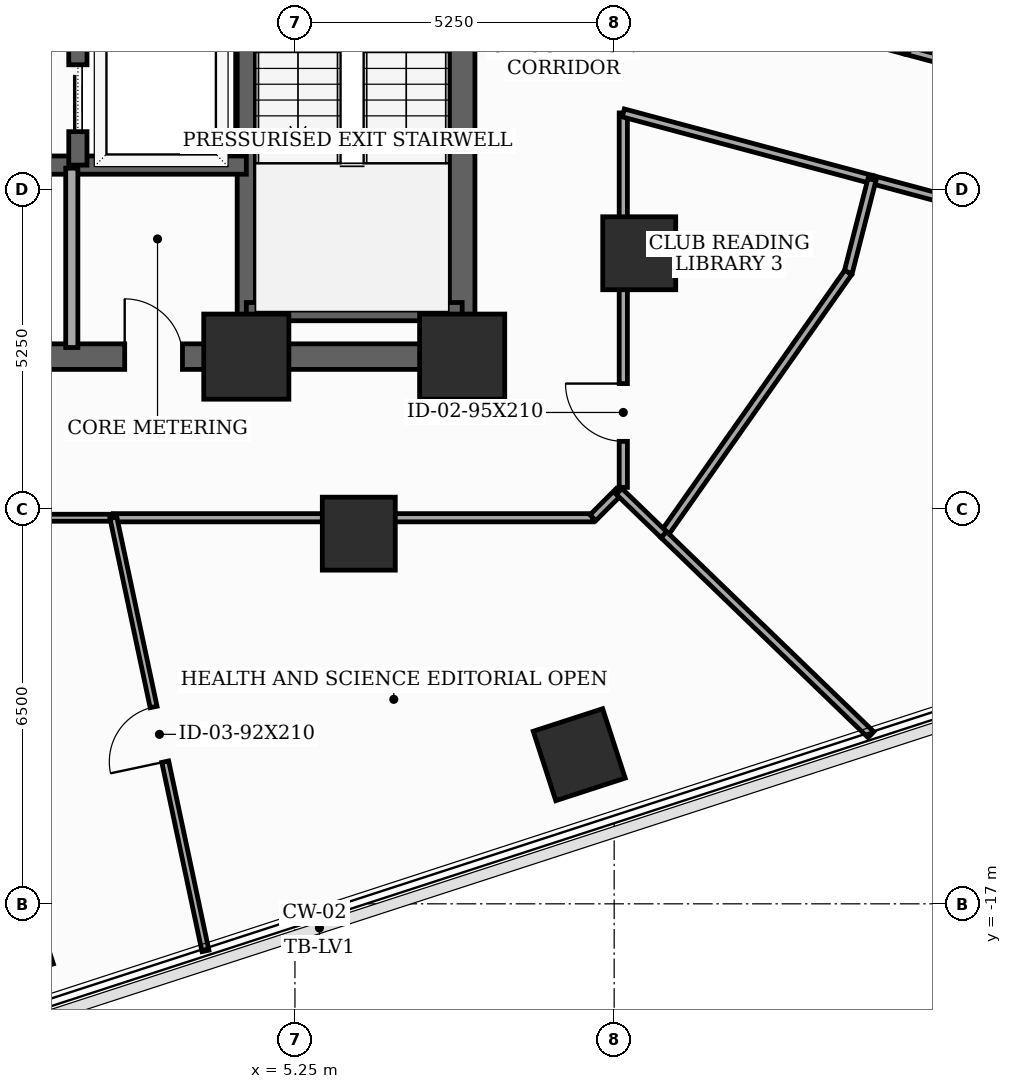
"""IFC4 building model, lengths in metres.
Left out: names, types, materials, properties, quantities, classifications, styles, units other than length and angle.
Written with IfcOpenShell. Run it as: python <this file> out.ifc"""

import sys

from ifc_helpers import new_model, si_unit, direction, frame, frame_2d, origin, origin_2d, place, context, subcontext, project, spatial, rectangle, extrude, element, fill, save


model = new_model("IFC4")
c1 = context("Model", 3, precision=1e-05, world=origin(), true_north=direction((0.0, 1.0)))
c2 = subcontext(c1, "Body", "Model", "MODEL_VIEW")
j1 = project(units=[si_unit("LENGTHUNIT", "METRE"), si_unit("PLANEANGLEUNIT", "RADIAN")], contexts=[c1])
p1 = place(None, origin())
s1 = spatial("IfcSite", under=j1, at=p1, CompositionType="ELEMENT")
p2 = place(p1, origin())
s2 = spatial("IfcBuilding", under=s1, at=p2, CompositionType="ELEMENT")
p3 = place(p2, frame((0.0, 0.0, 105.1)))
s3 = spatial("IfcBuildingStorey", under=s2, at=p3, CompositionType="ELEMENT", Elevation=105.1)
for number, where, z_axis, x_axis in (
    (1, (4.45, -8.0, 0.0), (0.0, 0.0, 1.0), (1.0, 0.0, 0.0)),
    (2, (8.0, -8.0, 0.0), (0.0, 0.0, 1.0), (1.0, 0.0, 0.0)),
):
    element("IfcColumn", number, at=place(p3, frame(where, z_axis=z_axis, x_axis=x_axis)), inside=s3, PredefinedType="COLUMN", context=c2, shape_type="SweptSolid", body=[
        extrude(rectangle(XDim=1.4, YDim=1.4, at=origin_2d()), origin(), (0.0, 0.0, 1.0), 3.7),
    ])
for number, where, z_axis, x_axis in (
    (3, (6.3, -10.912, 0.0), (0.0, 0.0, 1.0), (1.0, 0.0, 0.0)),
    (4, (10.912, -6.3, 0.0), (0.0, 0.0, 1.0), (1.0, 0.0, 0.0)),
    (5, (0.521, -17.603, 0.0), (0.0, 0.0, 1.0), (0.951, 0.309, 0.0)),
    (6, (9.925, -14.547, 0.0), (0.0, 0.0, 1.0), (0.951, 0.309, 0.0)),
):
    element("IfcColumn", number, at=place(p3, frame(where, z_axis=z_axis, x_axis=x_axis)), inside=s3, PredefinedType="COLUMN", context=c2, shape_type="SweptSolid", body=[
        extrude(rectangle(XDim=1.2, YDim=1.2, at=origin_2d()), origin(), (0.0, 0.0, 1.0), 3.7),
    ])
p4 = place(p3, frame((8.0, -8.0, 0.0), z_axis=(0.0, 0.0, 1.0), x_axis=(0.0, 1.0, 0.0)))
e7 = element("IfcWall", 7, at=p4, inside=s3, PredefinedType="SHEAR", context=c2, shape_type="SweptSolid", body=[
    extrude(rectangle(XDim=16.0, YDim=0.42, at=frame_2d((8.0, 0.0))), origin(), (0.0, 0.0, 1.0), 3.5),
])
p5 = place(p4, frame((9.6, 0.0, 0.0)))
e8 = element("IfcOpeningElement", 8, at=p5, cuts=e7, PredefinedType="OPENING", context=c2, shape_type="SweptSolid", body=[
    extrude(rectangle(XDim=1.05, YDim=2.15, at=frame_2d((0.525, 1.075))), frame((0.0, 0.22, 0.0), z_axis=(0.0, -1.0, 0.0), x_axis=(1.0, 0.0, 0.0)), (0.0, 0.0, 1.0), 0.44),
])
p6 = place(p4, frame((14.229, 0.0, 0.0)))
e9 = element("IfcOpeningElement", 9, at=p6, cuts=e7, PredefinedType="OPENING", context=c2, shape_type="SweptSolid", body=[
    extrude(rectangle(XDim=0.85, YDim=2.02, at=frame_2d((0.425, 1.01))), frame((0.0, 0.22, 0.0), z_axis=(0.0, -1.0, 0.0), x_axis=(1.0, 0.0, 0.0)), (0.0, 0.0, 1.0), 0.44),
])
p7 = place(p3, frame((-8.0, -8.0, 0.0), z_axis=(0.0, 0.0, 1.0), x_axis=(1.0, 0.0, 0.0)))
e10 = element("IfcWall", 10, at=p7, inside=s3, PredefinedType="SHEAR", context=c2, shape_type="SweptSolid", body=[
    extrude(rectangle(XDim=16.0, YDim=0.42, at=frame_2d((8.0, 0.0))), origin(), (0.0, 0.0, 1.0), 3.5),
])
p8 = place(p7, frame((4.6, 0.0, 0.0)))
e11 = element("IfcOpeningElement", 11, at=p8, cuts=e10, PredefinedType="OPENING", context=c2, shape_type="SweptSolid", body=[
    extrude(rectangle(XDim=0.95, YDim=2.1, at=frame_2d((0.475, 1.05))), frame((0.0, 0.22, 0.0), z_axis=(0.0, -1.0, 0.0), x_axis=(1.0, 0.0, 0.0)), (0.0, 0.0, 1.0), 0.44),
])
p9 = place(p7, frame((7.52, 0.0, 0.0)))
e12 = element("IfcOpeningElement", 12, at=p9, cuts=e10, PredefinedType="OPENING", context=c2, shape_type="SweptSolid", body=[
    extrude(rectangle(XDim=0.95, YDim=2.1, at=frame_2d((0.475, 1.05))), frame((0.0, 0.22, 0.0), z_axis=(0.0, -1.0, 0.0), x_axis=(1.0, 0.0, 0.0)), (0.0, 0.0, 1.0), 0.44),
])
p10 = place(p7, frame((10.45, 0.0, 0.0)))
e13 = element("IfcOpeningElement", 13, at=p10, cuts=e10, PredefinedType="OPENING", context=c2, shape_type="SweptSolid", body=[
    extrude(rectangle(XDim=0.95, YDim=2.1, at=frame_2d((0.475, 1.05))), frame((0.0, 0.22, 0.0), z_axis=(0.0, -1.0, 0.0), x_axis=(1.0, 0.0, 0.0)), (0.0, 0.0, 1.0), 0.44),
])
p11 = place(p3, frame((4.45, -7.79, 0.0), z_axis=(0.0, 0.0, 1.0), x_axis=(0.0, 1.0, 0.0)))
e14 = element("IfcWall", 14, at=p11, inside=s3, PredefinedType="SHEAR", context=c2, shape_type="SweptSolid", body=[
    extrude(rectangle(XDim=15.58, YDim=0.3, at=frame_2d((7.79, 0.0))), origin(), (0.0, 0.0, 1.0), 3.5),
])
p12 = place(p3, frame((4.45, -7.26, 0.0), z_axis=(0.0, 0.0, 1.0), x_axis=(1.0, 0.0, 0.0)))
e15 = element("IfcWall", 15, at=p12, inside=s3, PredefinedType="SHEAR", context=c2, shape_type="SweptSolid", body=[
    extrude(rectangle(XDim=3.55, YDim=0.3, at=frame_2d((1.775, 0.0))), origin(), (0.0, 0.0, 1.0), 3.5),
])
p13 = place(p3, frame((-4.45, -4.85, 0.0), z_axis=(0.0, 0.0, 1.0), x_axis=(1.0, 0.0, 0.0)))
e16 = element("IfcWall", 16, at=p13, inside=s3, PredefinedType="SHEAR", context=c2, shape_type="SweptSolid", body=[
    extrude(rectangle(XDim=8.9, YDim=0.3, at=frame_2d((4.45, 0.0))), origin(), (0.0, 0.0, 1.0), 3.5),
])
p14 = place(p3, frame((1.68, -4.85, 0.0), z_axis=(0.0, 0.0, 1.0), x_axis=(0.0, 1.0, 0.0)))
e17 = element("IfcWall", 17, at=p14, inside=s3, PredefinedType="SHEAR", context=c2, shape_type="SweptSolid", body=[
    extrude(rectangle(XDim=12.64, YDim=0.3, at=frame_2d((6.32, 0.0))), origin(), (0.0, 0.0, 1.0), 3.5),
])
p15 = place(p14, frame((0.55, 0.0, 0.0)))
e18 = element("IfcOpeningElement", 18, at=p15, cuts=e17, PredefinedType="OPENING", context=c2, shape_type="SweptSolid", body=[
    extrude(rectangle(XDim=1.1, YDim=2.1, at=frame_2d((0.55, 1.05))), frame((0.0, 0.16, 0.0), z_axis=(0.0, -1.0, 0.0), x_axis=(1.0, 0.0, 0.0)), (0.0, 0.0, 1.0), 0.32),
])
p16 = place(p14, frame((2.65, 0.0, 0.0)))
e19 = element("IfcOpeningElement", 19, at=p16, cuts=e17, PredefinedType="OPENING", context=c2, shape_type="SweptSolid", body=[
    extrude(rectangle(XDim=1.1, YDim=2.1, at=frame_2d((0.55, 1.05))), frame((0.0, 0.16, 0.0), z_axis=(0.0, -1.0, 0.0), x_axis=(1.0, 0.0, 0.0)), (0.0, 0.0, 1.0), 0.32),
])
p17 = place(p14, frame((4.75, 0.0, 0.0)))
e20 = element("IfcOpeningElement", 20, at=p17, cuts=e17, PredefinedType="OPENING", context=c2, shape_type="SweptSolid", body=[
    extrude(rectangle(XDim=1.1, YDim=2.1, at=frame_2d((0.55, 1.05))), frame((0.0, 0.16, 0.0), z_axis=(0.0, -1.0, 0.0), x_axis=(1.0, 0.0, 0.0)), (0.0, 0.0, 1.0), 0.32),
])
p18 = place(p14, frame((6.85, 0.0, 0.0)))
e21 = element("IfcOpeningElement", 21, at=p18, cuts=e17, PredefinedType="OPENING", context=c2, shape_type="SweptSolid", body=[
    extrude(rectangle(XDim=1.1, YDim=2.1, at=frame_2d((0.55, 1.05))), frame((0.0, 0.16, 0.0), z_axis=(0.0, -1.0, 0.0), x_axis=(1.0, 0.0, 0.0)), (0.0, 0.0, 1.0), 0.32),
])
p19 = place(p14, frame((8.95, 0.0, 0.0)))
e22 = element("IfcOpeningElement", 22, at=p19, cuts=e17, PredefinedType="OPENING", context=c2, shape_type="SweptSolid", body=[
    extrude(rectangle(XDim=1.1, YDim=2.1, at=frame_2d((0.55, 1.05))), frame((0.0, 0.16, 0.0), z_axis=(0.0, -1.0, 0.0), x_axis=(1.0, 0.0, 0.0)), (0.0, 0.0, 1.0), 0.32),
])
p20 = place(p14, frame((11.05, 0.0, 0.0)))
e23 = element("IfcOpeningElement", 23, at=p20, cuts=e17, PredefinedType="OPENING", context=c2, shape_type="SweptSolid", body=[
    extrude(rectangle(XDim=1.1, YDim=2.1, at=frame_2d((0.55, 1.05))), frame((0.0, 0.16, 0.0), z_axis=(0.0, -1.0, 0.0), x_axis=(1.0, 0.0, 0.0)), (0.0, 0.0, 1.0), 0.32),
])
p21 = place(p3, frame((1.58, -7.85, 0.0), z_axis=(0.0, 0.0, 1.0), x_axis=(0.0, 1.0, 0.0)))
e24 = element("IfcWall", 24, at=p21, inside=s3, PredefinedType="SOLIDWALL", context=c2, shape_type="SweptSolid", body=[
    extrude(rectangle(XDim=2.95, YDim=0.2, at=frame_2d((1.475, 0.0))), origin(), (0.0, 0.0, 1.0), 2.885),
])
p22 = place(p3, frame((-1.715, -10.65, 0.0), z_axis=(0.0, 0.0, 1.0), x_axis=(1.0, 0.0, 0.0)))
e25 = element("IfcWall", 25, at=p22, inside=s3, PredefinedType="PARTITIONING", context=c2, shape_type="SweptSolid", body=[
    extrude(rectangle(XDim=3.979, YDim=0.115, at=frame_2d((1.99, 0.0))), origin(), (0.0, 0.0, 1.0), 2.785),
])
p23 = place(p3, frame((14.74, -5.088, 0.0), z_axis=(0.0, 0.0, 1.0), x_axis=(0.965895912523, -0.258930659002, 0.0)))
e26 = element("IfcWall", 26, at=p23, inside=s3, PredefinedType="PARTITIONING", context=c2, shape_type="SweptSolid", body=[
    extrude(rectangle(XDim=7.045, YDim=0.135, at=frame_2d((3.522, 0.0))), origin(), (0.0, 0.0, 1.0), 2.935),
])
p24 = place(p3, frame((22.115, -4.787, 0.0), z_axis=(0.0, 0.0, 1.0), x_axis=(-0.965917838763, 0.258848853116, 0.0)))
e27 = element("IfcWall", 27, at=p24, inside=s3, PredefinedType="PARTITIONING", context=c2, shape_type="SweptSolid", body=[
    extrude(rectangle(XDim=7.07, YDim=0.135, at=frame_2d((3.535, 0.0))), origin(), (0.0, 0.0, 1.0), 2.935),
])
p25 = place(p24, frame((3.06, 0.0, 0.0)))
e28 = element("IfcOpeningElement", 28, at=p25, cuts=e27, PredefinedType="OPENING", context=c2, shape_type="SweptSolid", body=[
    extrude(rectangle(XDim=0.95, YDim=2.1, at=frame_2d((0.475, 1.05))), frame((0.0, 0.077, 0.0), z_axis=(0.0, -1.0, 0.0), x_axis=(1.0, 0.0, 0.0)), (0.0, 0.0, 1.0), 0.155),
])
p26 = place(p3, frame((10.65, -10.15, 0.0), z_axis=(0.0, 0.0, 1.0), x_axis=(0.0, 1.0, 0.0)))
e29 = element("IfcWall", 29, at=p26, inside=s3, PredefinedType="PARTITIONING", context=c2, shape_type="SweptSolid", body=[
    extrude(rectangle(XDim=6.158, YDim=0.135, at=frame_2d((3.079, 0.0))), origin(), (0.0, 0.0, 1.0), 2.785),
])
p27 = place(p26, frame((0.757, 0.0, 0.0)))
e30 = element("IfcOpeningElement", 30, at=p27, cuts=e29, PredefinedType="OPENING", context=c2, shape_type="SweptSolid", body=[
    extrude(rectangle(XDim=0.95, YDim=2.1, at=frame_2d((0.475, 1.05))), frame((0.0, 0.077, 0.0), z_axis=(0.0, -1.0, 0.0), x_axis=(1.0, 0.0, 0.0)), (0.0, 0.0, 1.0), 0.155),
])
p28 = place(p3, frame((10.65, -3.992, 0.0), z_axis=(0.0, 0.0, 1.0), x_axis=(0.965925146235, -0.258821583086, 0.0)))
e31 = element("IfcWall", 31, at=p28, inside=s3, PredefinedType="PARTITIONING", context=c2, shape_type="SweptSolid", body=[
    extrude(rectangle(XDim=4.234, YDim=0.135, at=frame_2d((2.117, 0.0))), origin(), (0.0, 0.0, 1.0), 2.785),
])
p29 = place(p3, frame((15.286, -2.957, 0.0), z_axis=(0.0, 0.0, 1.0), x_axis=(-0.965939651128, 0.258767444588, 0.0)))
e32 = element("IfcWall", 32, at=p29, inside=s3, PredefinedType="PARTITIONING", context=c2, shape_type="SweptSolid", body=[
    extrude(rectangle(XDim=4.8, YDim=0.135, at=frame_2d((2.4, 0.0))), origin(), (0.0, 0.0, 1.0), 2.785),
])
p30 = place(p3, frame((2.264, -10.65, 0.0), z_axis=(0.0, 0.0, 1.0), x_axis=(1.0, 0.0, 0.0)))
e33 = element("IfcWall", 33, at=p30, inside=s3, PredefinedType="PARTITIONING", context=c2, shape_type="SweptSolid", body=[
    extrude(rectangle(XDim=7.886, YDim=0.135, at=frame_2d((3.943, 0.0))), origin(), (0.0, 0.0, 1.0), 2.785),
])
p31 = place(p3, frame((10.15, -10.65, 0.0), z_axis=(0.0, 0.0, 1.0), x_axis=(0.70730655707, 0.706906948845, 0.0)))
e34 = element("IfcWall", 34, at=p31, inside=s3, PredefinedType="PARTITIONING", context=c2, shape_type="SweptSolid", body=[
    extrude(rectangle(XDim=0.611, YDim=0.135, at=frame_2d((0.305, 0.0))), origin(), (0.0, 0.0, 1.0), 3.5),
])
p32 = place(p3, frame((3.778, -17.774, 0.0), z_axis=(0.0, 0.0, 1.0), x_axis=(-0.207917284361, 0.978146411773, 0.0)))
e35 = element("IfcWall", 35, at=p32, inside=s3, PredefinedType="PARTITIONING", context=c2, shape_type="SweptSolid", body=[
    extrude(rectangle(XDim=7.284, YDim=0.115, at=frame_2d((3.642, 0.0))), origin(), (0.0, 0.0, 1.0), 2.785),
])
p33 = place(p32, frame((3.182, 0.0, 0.0)))
e36 = element("IfcOpeningElement", 36, at=p33, cuts=e35, PredefinedType="OPENING", context=c2, shape_type="SweptSolid", body=[
    extrude(rectangle(XDim=0.92, YDim=2.1, at=frame_2d((0.46, 1.05))), frame((0.0, 0.067, 0.0), z_axis=(0.0, -1.0, 0.0), x_axis=(1.0, 0.0, 0.0)), (0.0, 0.0, 1.0), 0.135),
])
p34 = place(p3, frame((14.74, -5.088, 0.0), z_axis=(0.0, 0.0, 1.0), x_axis=(-0.247961711117, -0.968769833252, 0.0)))
e37 = element("IfcWall", 37, at=p34, inside=s3, PredefinedType="PARTITIONING", context=c2, shape_type="SweptSolid", body=[
    extrude(rectangle(XDim=1.576, YDim=0.135, at=frame_2d((0.788, 0.0))), origin(), (0.0, 0.0, 1.0), 3.5),
])
p35 = place(p3, frame((14.349, -6.615, 0.0), z_axis=(0.0, 0.0, 1.0), x_axis=(-0.575468172254, -0.817824175922, 0.0)))
e38 = element("IfcWall", 38, at=p35, inside=s3, PredefinedType="PARTITIONING", context=c2, shape_type="SweptSolid", body=[
    extrude(rectangle(XDim=5.272, YDim=0.135, at=frame_2d((2.636, 0.0))), origin(), (0.0, 0.0, 1.0), 2.785),
])
p36 = place(p3, frame((11.315, -10.927, 0.0), z_axis=(0.0, 0.0, 1.0), x_axis=(0.719365057957, -0.694632214478, 0.0)))
e39 = element("IfcWall", 39, at=p36, inside=s3, PredefinedType="PARTITIONING", context=c2, shape_type="SweptSolid", body=[
    extrude(rectangle(XDim=4.738, YDim=0.135, at=frame_2d((2.369, 0.0))), origin(), (0.0, 0.0, 1.0), 2.935),
])
p37 = place(p3, frame((10.582, -10.218, 0.0), z_axis=(0.0, 0.0, 1.0), x_axis=(0.718741071219, -0.695277838381, 0.0)))
e40 = element("IfcWall", 40, at=p37, inside=s3, PredefinedType="PARTITIONING", context=c2, shape_type="SweptSolid", body=[
    extrude(rectangle(XDim=1.02, YDim=0.135, at=frame_2d((0.51, 0.0))), origin(), (0.0, 0.0, 1.0), 3.5),
])
p38 = place(p10, origin())
e41 = element("IfcDoor", 41, at=p38, inside=s3, OperationType="SINGLE_SWING_LEFT", PredefinedType="DOOR", context=c2, shape_type="SweptSolid", body=[
    extrude(rectangle(XDim=0.95, YDim=2.1, at=frame_2d((0.475, 1.05))), frame((0.0, 0.025, 0.0), z_axis=(0.0, -1.0, 0.0), x_axis=(1.0, 0.0, 0.0)), (0.0, 0.0, 1.0), 0.05),
])
fill(e13, e41)
p39 = place(p15, origin())
e42 = element("IfcDoor", 42, at=p39, inside=s3, OperationType="SLIDING_TO_LEFT", PredefinedType="DOOR", context=c2, shape_type="SweptSolid", body=[
    extrude(rectangle(XDim=1.1, YDim=2.1, at=frame_2d((0.55, 1.05))), frame((0.0, 0.025, 0.0), z_axis=(0.0, -1.0, 0.0), x_axis=(1.0, 0.0, 0.0)), (0.0, 0.0, 1.0), 0.05),
])
fill(e18, e42)
p40 = place(p27, origin())
e43 = element("IfcDoor", 43, at=p40, inside=s3, OperationType="SINGLE_SWING_RIGHT", PredefinedType="DOOR", context=c2, shape_type="SweptSolid", body=[
    extrude(rectangle(XDim=0.95, YDim=2.1, at=frame_2d((0.475, 1.05))), frame((0.0, 0.025, 0.0), z_axis=(0.0, -1.0, 0.0), x_axis=(1.0, 0.0, 0.0)), (0.0, 0.0, 1.0), 0.05),
])
fill(e30, e43)
p41 = place(p33, origin())
e44 = element("IfcDoor", 44, at=p41, inside=s3, OperationType="SINGLE_SWING_LEFT", PredefinedType="DOOR", context=c2, shape_type="SweptSolid", body=[
    extrude(rectangle(XDim=0.92, YDim=2.1, at=frame_2d((0.46, 1.05))), frame((0.0, 0.025, 0.0), z_axis=(0.0, -1.0, 0.0), x_axis=(1.0, 0.0, 0.0)), (0.0, 0.0, 1.0), 0.05),
])
fill(e36, e44)
save(model, sys.argv[1])
